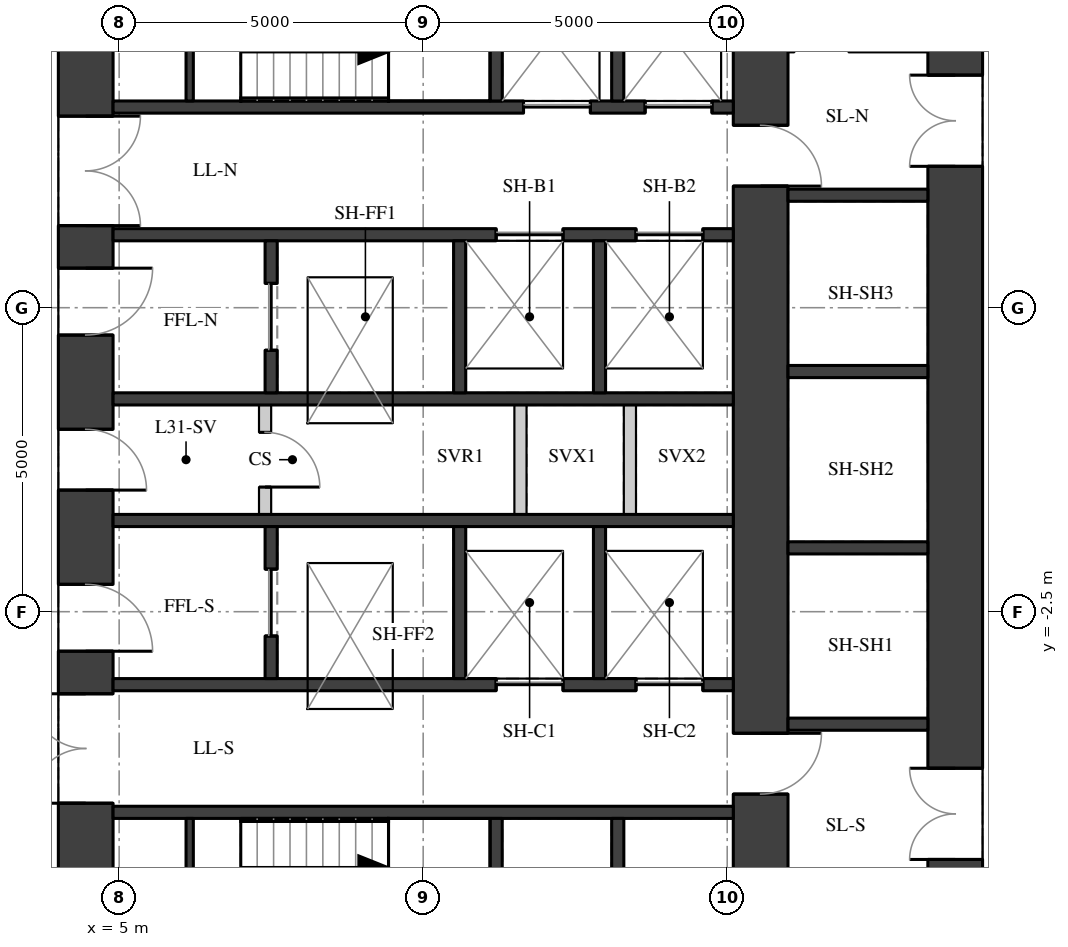
"""IFC4 building model, lengths in metres.
Left out: names, types, materials, properties, quantities, classifications, styles, units other than length and angle.
Written with IfcOpenShell. Run it as: python <this file> out.ifc"""

import sys

from ifc_helpers import new_model, si_unit, direction, frame, frame_2d, origin, place, context, subcontext, project, spatial, rectangle, extrude, element, fill, save


model = new_model("IFC4")
c1 = context("Model", 3, precision=1e-05, world=origin(), true_north=direction((0.0, 1.0)))
c2 = subcontext(c1, "Body", "Model", "MODEL_VIEW")
j1 = project(units=[si_unit("LENGTHUNIT", "METRE"), si_unit("PLANEANGLEUNIT", "RADIAN")], contexts=[c1])
p1 = place(None, origin())
s1 = spatial("IfcSite", under=j1, at=p1, CompositionType="ELEMENT")
p2 = place(p1, origin())
s2 = spatial("IfcBuilding", under=s1, at=p2, CompositionType="ELEMENT")
p3 = place(p2, frame((0.0, 0.0, 112.0)))
s3 = spatial("IfcBuildingStorey", under=s2, at=p3, CompositionType="ELEMENT", Elevation=112.0)
p4 = place(p3, frame((4.45, -11.1, 0.0), z_axis=(0.0, 0.0, 1.0), x_axis=(0.0, 1.0, 0.0)))
e1 = element("IfcWall", 1, at=p4, inside=s3, PredefinedType="SHEAR", context=c2, shape_type="SweptSolid", body=[
    extrude(rectangle(XDim=22.2, YDim=0.9, at=frame_2d((11.1, 0.0))), origin(), (0.0, 0.0, 1.0), 3.02),
])
p5 = place(p4, frame((2.35, 0.0, 0.0)))
e2 = element("IfcOpeningElement", 2, at=p5, cuts=e1, PredefinedType="OPENING", context=c2, shape_type="SweptSolid", body=[
    extrude(rectangle(XDim=1.5, YDim=2.1, at=frame_2d((0.75, 1.05))), frame((0.0, 0.46, 0.0), z_axis=(0.0, -1.0, 0.0), x_axis=(1.0, 0.0, 0.0)), (0.0, 0.0, 1.0), 0.92),
])
p6 = place(p4, frame((5.45, 0.0, 0.0)))
e3 = element("IfcOpeningElement", 3, at=p6, cuts=e1, PredefinedType="OPENING", context=c2, shape_type="SweptSolid", body=[
    extrude(rectangle(XDim=1.8, YDim=2.1, at=frame_2d((0.9, 1.05))), frame((0.0, 0.46, 0.0), z_axis=(0.0, -1.0, 0.0), x_axis=(1.0, 0.0, 0.0)), (0.0, 0.0, 1.0), 0.92),
])
p7 = place(p4, frame((7.95, 0.0, 0.0)))
e4 = element("IfcOpeningElement", 4, at=p7, cuts=e1, PredefinedType="OPENING", context=c2, shape_type="SweptSolid", body=[
    extrude(rectangle(XDim=1.1, YDim=2.1, at=frame_2d((0.55, 1.05))), frame((0.0, 0.46, 0.0), z_axis=(0.0, -1.0, 0.0), x_axis=(1.0, 0.0, 0.0)), (0.0, 0.0, 1.0), 0.92),
])
p8 = place(p4, frame((10.6, 0.0, 0.0)))
e5 = element("IfcOpeningElement", 5, at=p8, cuts=e1, PredefinedType="OPENING", context=c2, shape_type="SweptSolid", body=[
    extrude(rectangle(XDim=1.0, YDim=2.1, at=frame_2d((0.5, 1.05))), frame((0.0, 0.46, 0.0), z_axis=(0.0, -1.0, 0.0), x_axis=(1.0, 0.0, 0.0)), (0.0, 0.0, 1.0), 0.92),
])
p9 = place(p4, frame((13.15, 0.0, 0.0)))
e6 = element("IfcOpeningElement", 6, at=p9, cuts=e1, PredefinedType="OPENING", context=c2, shape_type="SweptSolid", body=[
    extrude(rectangle(XDim=1.1, YDim=2.1, at=frame_2d((0.55, 1.05))), frame((0.0, 0.46, 0.0), z_axis=(0.0, -1.0, 0.0), x_axis=(1.0, 0.0, 0.0)), (0.0, 0.0, 1.0), 0.92),
])
p10 = place(p4, frame((14.95, 0.0, 0.0)))
e7 = element("IfcOpeningElement", 7, at=p10, cuts=e1, PredefinedType="OPENING", context=c2, shape_type="SweptSolid", body=[
    extrude(rectangle(XDim=1.8, YDim=2.1, at=frame_2d((0.9, 1.05))), frame((0.0, 0.46, 0.0), z_axis=(0.0, -1.0, 0.0), x_axis=(1.0, 0.0, 0.0)), (0.0, 0.0, 1.0), 0.92),
])
p11 = place(p4, frame((18.35, 0.0, 0.0)))
e8 = element("IfcOpeningElement", 8, at=p11, cuts=e1, PredefinedType="OPENING", context=c2, shape_type="SweptSolid", body=[
    extrude(rectangle(XDim=1.5, YDim=2.1, at=frame_2d((0.75, 1.05))), frame((0.0, 0.46, 0.0), z_axis=(0.0, -1.0, 0.0), x_axis=(1.0, 0.0, 0.0)), (0.0, 0.0, 1.0), 0.92),
])
p12 = place(p3, frame((18.75, -11.1, 0.0), z_axis=(0.0, 0.0, 1.0), x_axis=(0.0, 1.0, 0.0)))
e9 = element("IfcWall", 9, at=p12, inside=s3, PredefinedType="SHEAR", context=c2, shape_type="SweptSolid", body=[
    extrude(rectangle(XDim=22.2, YDim=0.9, at=frame_2d((11.1, 0.0))), origin(), (0.0, 0.0, 1.0), 3.02),
])
p13 = place(p12, frame((15.925, 0.0, 0.0)))
e10 = element("IfcOpeningElement", 10, at=p13, cuts=e9, PredefinedType="OPENING", context=c2, shape_type="SweptSolid", body=[
    extrude(rectangle(XDim=1.5, YDim=2.1, at=frame_2d((0.75, 1.05))), frame((0.0, 0.46, 0.0), z_axis=(0.0, -1.0, 0.0), x_axis=(1.0, 0.0, 0.0)), (0.0, 0.0, 1.0), 0.92),
])
p14 = place(p12, frame((4.525, 0.0, 0.0)))
e11 = element("IfcOpeningElement", 11, at=p14, cuts=e9, PredefinedType="OPENING", context=c2, shape_type="SweptSolid", body=[
    extrude(rectangle(XDim=1.5, YDim=2.1, at=frame_2d((0.75, 1.05))), frame((0.0, 0.46, 0.0), z_axis=(0.0, -1.0, 0.0), x_axis=(1.0, 0.0, 0.0)), (0.0, 0.0, 1.0), 0.92),
])
p15 = place(p3, frame((15.55, -11.1, 0.0), z_axis=(0.0, 0.0, 1.0), x_axis=(0.0, 1.0, 0.0)))
e12 = element("IfcWall", 12, at=p15, inside=s3, PredefinedType="SHEAR", context=c2, shape_type="SweptSolid", body=[
    extrude(rectangle(XDim=22.2, YDim=0.9, at=frame_2d((11.1, 0.0))), origin(), (0.0, 0.0, 1.0), 3.02),
])
p16 = place(p15, frame((15.6, 0.0, 0.0)))
e13 = element("IfcOpeningElement", 13, at=p16, cuts=e12, PredefinedType="OPENING", context=c2, shape_type="SweptSolid", body=[
    extrude(rectangle(XDim=1.0, YDim=2.1, at=frame_2d((0.5, 1.05))), frame((0.0, 0.46, 0.0), z_axis=(0.0, -1.0, 0.0), x_axis=(1.0, 0.0, 0.0)), (0.0, 0.0, 1.0), 0.92),
])
p17 = place(p15, frame((5.6, 0.0, 0.0)))
e14 = element("IfcOpeningElement", 14, at=p17, cuts=e12, PredefinedType="OPENING", context=c2, shape_type="SweptSolid", body=[
    extrude(rectangle(XDim=1.0, YDim=2.1, at=frame_2d((0.5, 1.05))), frame((0.0, 0.46, 0.0), z_axis=(0.0, -1.0, 0.0), x_axis=(1.0, 0.0, 0.0)), (0.0, 0.0, 1.0), 0.92),
])
p18 = place(p3, frame((4.9, 5.8, 0.0), z_axis=(0.0, 0.0, 1.0), x_axis=(1.0, 0.0, 0.0)))
e15 = element("IfcWall", 15, at=p18, inside=s3, PredefinedType="SHEAR", context=c2, shape_type="SweptSolid", body=[
    extrude(rectangle(XDim=10.2, YDim=0.2, at=frame_2d((5.1, 0.0))), origin(), (0.0, 0.0, 1.0), 3.02),
])
p19 = place(p18, frame((6.75, 0.0, 0.0)))
e16 = element("IfcOpeningElement", 16, at=p19, cuts=e15, PredefinedType="OPENING", context=c2, shape_type="SweptSolid", body=[
    extrude(rectangle(XDim=1.1, YDim=2.1, at=frame_2d((0.55, 1.05))), frame((0.0, 0.11, 0.0), z_axis=(0.0, -1.0, 0.0), x_axis=(1.0, 0.0, 0.0)), (0.0, 0.0, 1.0), 0.22),
])
p20 = place(p18, frame((8.75, 0.0, 0.0)))
e17 = element("IfcOpeningElement", 17, at=p20, cuts=e15, PredefinedType="OPENING", context=c2, shape_type="SweptSolid", body=[
    extrude(rectangle(XDim=1.1, YDim=2.1, at=frame_2d((0.55, 1.05))), frame((0.0, 0.11, 0.0), z_axis=(0.0, -1.0, 0.0), x_axis=(1.0, 0.0, 0.0)), (0.0, 0.0, 1.0), 0.22),
])
p21 = place(p3, frame((4.9, 3.7, 0.0), z_axis=(0.0, 0.0, 1.0), x_axis=(1.0, 0.0, 0.0)))
e18 = element("IfcWall", 18, at=p21, inside=s3, PredefinedType="SHEAR", context=c2, shape_type="SweptSolid", body=[
    extrude(rectangle(XDim=10.2, YDim=0.2, at=frame_2d((5.1, 0.0))), origin(), (0.0, 0.0, 1.0), 3.02),
])
p22 = place(p21, frame((6.3, 0.0, 0.0)))
e19 = element("IfcOpeningElement", 19, at=p22, cuts=e18, PredefinedType="OPENING", context=c2, shape_type="SweptSolid", body=[
    extrude(rectangle(XDim=1.1, YDim=2.1, at=frame_2d((0.55, 1.05))), frame((0.0, 0.11, 0.0), z_axis=(0.0, -1.0, 0.0), x_axis=(1.0, 0.0, 0.0)), (0.0, 0.0, 1.0), 0.22),
])
p23 = place(p21, frame((8.6, 0.0, 0.0)))
e20 = element("IfcOpeningElement", 20, at=p23, cuts=e18, PredefinedType="OPENING", context=c2, shape_type="SweptSolid", body=[
    extrude(rectangle(XDim=1.1, YDim=2.1, at=frame_2d((0.55, 1.05))), frame((0.0, 0.11, 0.0), z_axis=(0.0, -1.0, 0.0), x_axis=(1.0, 0.0, 0.0)), (0.0, 0.0, 1.0), 0.22),
])
for number, where, z_axis, x_axis in (
    (21, (4.9, 1.0, 0.0), (0.0, 0.0, 1.0), (1.0, 0.0, 0.0)),
    (22, (4.9, -1.0, 0.0), (0.0, 0.0, 1.0), (1.0, 0.0, 0.0)),
):
    element("IfcWall", number, at=place(p3, frame(where, z_axis=z_axis, x_axis=x_axis)), inside=s3, PredefinedType="SHEAR", context=c2, shape_type="SweptSolid", body=[
        extrude(rectangle(XDim=10.2, YDim=0.2, at=frame_2d((5.1, 0.0))), origin(), (0.0, 0.0, 1.0), 3.02),
    ])
p24 = place(p3, frame((4.9, -3.7, 0.0), z_axis=(0.0, 0.0, 1.0), x_axis=(1.0, 0.0, 0.0)))
e23 = element("IfcWall", 23, at=p24, inside=s3, PredefinedType="SHEAR", context=c2, shape_type="SweptSolid", body=[
    extrude(rectangle(XDim=10.2, YDim=0.2, at=frame_2d((5.1, 0.0))), origin(), (0.0, 0.0, 1.0), 3.02),
])
p25 = place(p24, frame((6.3, 0.0, 0.0)))
e24 = element("IfcOpeningElement", 24, at=p25, cuts=e23, PredefinedType="OPENING", context=c2, shape_type="SweptSolid", body=[
    extrude(rectangle(XDim=1.1, YDim=2.1, at=frame_2d((0.55, 1.05))), frame((0.0, 0.11, 0.0), z_axis=(0.0, -1.0, 0.0), x_axis=(1.0, 0.0, 0.0)), (0.0, 0.0, 1.0), 0.22),
])
p26 = place(p24, frame((8.6, 0.0, 0.0)))
e25 = element("IfcOpeningElement", 25, at=p26, cuts=e23, PredefinedType="OPENING", context=c2, shape_type="SweptSolid", body=[
    extrude(rectangle(XDim=1.1, YDim=2.1, at=frame_2d((0.55, 1.05))), frame((0.0, 0.11, 0.0), z_axis=(0.0, -1.0, 0.0), x_axis=(1.0, 0.0, 0.0)), (0.0, 0.0, 1.0), 0.22),
])
p27 = place(p3, frame((4.9, -5.8, 0.0), z_axis=(0.0, 0.0, 1.0), x_axis=(1.0, 0.0, 0.0)))
e26 = element("IfcWall", 26, at=p27, inside=s3, PredefinedType="SHEAR", context=c2, shape_type="SweptSolid", body=[
    extrude(rectangle(XDim=10.2, YDim=0.2, at=frame_2d((5.1, 0.0))), origin(), (0.0, 0.0, 1.0), 3.02),
])
for number, where, z_axis, x_axis in (
    (27, (11.2, 5.9, 0.0), (0.0, 0.0, 1.0), (0.0, 1.0, 0.0)),
    (28, (11.2, -9.1, 0.0), (0.0, 0.0, 1.0), (0.0, 1.0, 0.0)),
    (29, (13.2, 5.9, 0.0), (0.0, 0.0, 1.0), (0.0, 1.0, 0.0)),
    (30, (13.2, -9.1, 0.0), (0.0, 0.0, 1.0), (0.0, 1.0, 0.0)),
):
    element("IfcWall", number, at=place(p3, frame(where, z_axis=z_axis, x_axis=x_axis)), inside=s3, PredefinedType="SHEAR", context=c2, shape_type="SweptSolid", body=[
        extrude(rectangle(XDim=3.2, YDim=0.2, at=frame_2d((1.6, 0.0))), origin(), (0.0, 0.0, 1.0), 3.02),
    ])
p28 = place(p3, frame((7.5, 1.1, 0.0), z_axis=(0.0, 0.0, 1.0), x_axis=(0.0, 1.0, 0.0)))
e31 = element("IfcWall", 31, at=p28, inside=s3, PredefinedType="SHEAR", context=c2, shape_type="SweptSolid", body=[
    extrude(rectangle(XDim=2.5, YDim=0.2, at=frame_2d((1.25, 0.0))), origin(), (0.0, 0.0, 1.0), 3.02),
])
p29 = place(p28, frame((0.7, 0.0, 0.0)))
e32 = element("IfcOpeningElement", 32, at=p29, cuts=e31, PredefinedType="OPENING", context=c2, shape_type="SweptSolid", body=[
    extrude(rectangle(XDim=1.1, YDim=2.1, at=frame_2d((0.55, 1.05))), frame((0.0, 0.11, 0.0), z_axis=(0.0, -1.0, 0.0), x_axis=(1.0, 0.0, 0.0)), (0.0, 0.0, 1.0), 0.22),
])
p30 = place(p3, frame((7.5, -3.6, 0.0), z_axis=(0.0, 0.0, 1.0), x_axis=(0.0, 1.0, 0.0)))
e33 = element("IfcWall", 33, at=p30, inside=s3, PredefinedType="SHEAR", context=c2, shape_type="SweptSolid", body=[
    extrude(rectangle(XDim=2.5, YDim=0.2, at=frame_2d((1.25, 0.0))), origin(), (0.0, 0.0, 1.0), 3.02),
])
p31 = place(p30, frame((0.7, 0.0, 0.0)))
e34 = element("IfcOpeningElement", 34, at=p31, cuts=e33, PredefinedType="OPENING", context=c2, shape_type="SweptSolid", body=[
    extrude(rectangle(XDim=1.1, YDim=2.1, at=frame_2d((0.55, 1.05))), frame((0.0, 0.11, 0.0), z_axis=(0.0, -1.0, 0.0), x_axis=(1.0, 0.0, 0.0)), (0.0, 0.0, 1.0), 0.22),
])
for number, where, z_axis, x_axis in (
    (35, (10.6, 1.1, 0.0), (0.0, 0.0, 1.0), (0.0, 1.0, 0.0)),
    (36, (10.6, -3.6, 0.0), (0.0, 0.0, 1.0), (0.0, 1.0, 0.0)),
    (37, (12.9, 1.1, 0.0), (0.0, 0.0, 1.0), (0.0, 1.0, 0.0)),
    (38, (12.9, -3.6, 0.0), (0.0, 0.0, 1.0), (0.0, 1.0, 0.0)),
):
    element("IfcWall", number, at=place(p3, frame(where, z_axis=z_axis, x_axis=x_axis)), inside=s3, PredefinedType="SHEAR", context=c2, shape_type="SweptSolid", body=[
        extrude(rectangle(XDim=2.5, YDim=0.2, at=frame_2d((1.25, 0.0))), origin(), (0.0, 0.0, 1.0), 3.02),
    ])
p32 = place(p3, frame((6.16, 5.9, 0.0), z_axis=(0.0, 0.0, 1.0), x_axis=(0.0, 1.0, 0.0)))
e39 = element("IfcWall", 39, at=p32, inside=s3, PredefinedType="SHEAR", context=c2, shape_type="SweptSolid", body=[
    extrude(rectangle(XDim=3.2, YDim=0.12, at=frame_2d((1.6, 0.0))), origin(), (0.0, 0.0, 1.0), 3.02),
])
p33 = place(p32, frame((0.85, 0.0, 0.0)))
e40 = element("IfcOpeningElement", 40, at=p33, cuts=e39, PredefinedType="OPENING", context=c2, shape_type="SweptSolid", body=[
    extrude(rectangle(XDim=1.5, YDim=2.1, at=frame_2d((0.75, 1.05))), frame((0.0, 0.07, 0.0), z_axis=(0.0, -1.0, 0.0), x_axis=(1.0, 0.0, 0.0)), (0.0, 0.0, 1.0), 0.14),
])
p34 = place(p3, frame((6.16, -9.1, 0.0), z_axis=(0.0, 0.0, 1.0), x_axis=(0.0, 1.0, 0.0)))
e41 = element("IfcWall", 41, at=p34, inside=s3, PredefinedType="SHEAR", context=c2, shape_type="SweptSolid", body=[
    extrude(rectangle(XDim=3.2, YDim=0.12, at=frame_2d((1.6, 0.0))), origin(), (0.0, 0.0, 1.0), 3.02),
])
p35 = place(p34, frame((0.85, 0.0, 0.0)))
e42 = element("IfcOpeningElement", 42, at=p35, cuts=e41, PredefinedType="OPENING", context=c2, shape_type="SweptSolid", body=[
    extrude(rectangle(XDim=1.5, YDim=2.1, at=frame_2d((0.75, 1.05))), frame((0.0, 0.07, 0.0), z_axis=(0.0, -1.0, 0.0), x_axis=(1.0, 0.0, 0.0)), (0.0, 0.0, 1.0), 0.14),
])
p36 = place(p3, frame((7.4, -0.9, 0.0), z_axis=(0.0, 0.0, 1.0), x_axis=(0.0, 1.0, 0.0)))
e43 = element("IfcWall", 43, at=p36, inside=s3, PredefinedType="PARTITIONING", context=c2, shape_type="SweptSolid", body=[
    extrude(rectangle(XDim=1.8, YDim=0.2, at=frame_2d((0.9, 0.0))), origin(), (0.0, 0.0, 1.0), 3.02),
])
p37 = place(p36, frame((0.45, 0.0, 0.0)))
e44 = element("IfcOpeningElement", 44, at=p37, cuts=e43, PredefinedType="OPENING", context=c2, shape_type="SweptSolid", body=[
    extrude(rectangle(XDim=0.9, YDim=2.1, at=frame_2d((0.45, 1.05))), frame((0.0, 0.11, 0.0), z_axis=(0.0, -1.0, 0.0), x_axis=(1.0, 0.0, 0.0)), (0.0, 0.0, 1.0), 0.22),
])
for number, where, z_axis, x_axis in (
    (45, (11.6, -0.9, 0.0), (0.0, 0.0, 1.0), (0.0, 1.0, 0.0)),
    (46, (13.4, -0.9, 0.0), (0.0, 0.0, 1.0), (0.0, 1.0, 0.0)),
):
    element("IfcWall", number, at=place(p3, frame(where, z_axis=z_axis, x_axis=x_axis)), inside=s3, PredefinedType="PARTITIONING", context=c2, shape_type="SweptSolid", body=[
        extrude(rectangle(XDim=1.8, YDim=0.2, at=frame_2d((0.9, 0.0))), origin(), (0.0, 0.0, 1.0), 3.02),
    ])
for number, where, z_axis, x_axis in (
    (47, (16.0, -4.35, 0.0), (0.0, 0.0, 1.0), (1.0, 0.0, 0.0)),
    (48, (16.0, -1.45, 0.0), (0.0, 0.0, 1.0), (1.0, 0.0, 0.0)),
    (49, (16.0, 1.45, 0.0), (0.0, 0.0, 1.0), (1.0, 0.0, 0.0)),
    (50, (16.0, 4.35, 0.0), (0.0, 0.0, 1.0), (1.0, 0.0, 0.0)),
):
    element("IfcWall", number, at=place(p3, frame(where, z_axis=z_axis, x_axis=x_axis)), inside=s3, PredefinedType="SHEAR", context=c2, shape_type="SweptSolid", body=[
        extrude(rectangle(XDim=2.3, YDim=0.2, at=frame_2d((1.15, 0.0))), origin(), (0.0, 0.0, 1.0), 3.02),
    ])
p38 = place(p6, origin())
e51 = element("IfcDoor", 51, at=p38, inside=s3, OperationType="DOUBLE_DOOR_SINGLE_SWING", PredefinedType="DOOR", context=c2, shape_type="SweptSolid", body=[
    extrude(rectangle(XDim=1.8, YDim=2.1, at=frame_2d((0.9, 1.05))), frame((0.0, 0.025, 0.0), z_axis=(0.0, -1.0, 0.0), x_axis=(1.0, 0.0, 0.0)), (0.0, 0.0, 1.0), 0.05),
])
fill(e3, e51)
p39 = place(p7, origin())
e52 = element("IfcDoor", 52, at=p39, inside=s3, OperationType="SINGLE_SWING_RIGHT", PredefinedType="DOOR", context=c2, shape_type="SweptSolid", body=[
    extrude(rectangle(XDim=1.1, YDim=2.1, at=frame_2d((0.55, 1.05))), frame((0.0, 0.025, 0.0), z_axis=(0.0, -1.0, 0.0), x_axis=(1.0, 0.0, 0.0)), (0.0, 0.0, 1.0), 0.05),
])
fill(e4, e52)
p40 = place(p8, origin())
e53 = element("IfcDoor", 53, at=p40, inside=s3, OperationType="SINGLE_SWING_RIGHT", PredefinedType="DOOR", context=c2, shape_type="SweptSolid", body=[
    extrude(rectangle(XDim=1.0, YDim=2.1, at=frame_2d((0.5, 1.05))), frame((0.0, 0.025, 0.0), z_axis=(0.0, -1.0, 0.0), x_axis=(1.0, 0.0, 0.0)), (0.0, 0.0, 1.0), 0.05),
])
fill(e5, e53)
p41 = place(p9, origin())
e54 = element("IfcDoor", 54, at=p41, inside=s3, OperationType="SINGLE_SWING_LEFT", PredefinedType="DOOR", context=c2, shape_type="SweptSolid", body=[
    extrude(rectangle(XDim=1.1, YDim=2.1, at=frame_2d((0.55, 1.05))), frame((0.0, 0.025, 0.0), z_axis=(0.0, -1.0, 0.0), x_axis=(1.0, 0.0, 0.0)), (0.0, 0.0, 1.0), 0.05),
])
fill(e6, e54)
p42 = place(p10, origin())
e55 = element("IfcDoor", 55, at=p42, inside=s3, OperationType="DOUBLE_DOOR_SINGLE_SWING", PredefinedType="DOOR", context=c2, shape_type="SweptSolid", body=[
    extrude(rectangle(XDim=1.8, YDim=2.1, at=frame_2d((0.9, 1.05))), frame((0.0, 0.025, 0.0), z_axis=(0.0, -1.0, 0.0), x_axis=(1.0, 0.0, 0.0)), (0.0, 0.0, 1.0), 0.05),
])
fill(e7, e55)
p43 = place(p13, origin())
e56 = element("IfcDoor", 56, at=p43, inside=s3, OperationType="DOUBLE_DOOR_SINGLE_SWING", PredefinedType="DOOR", context=c2, shape_type="SweptSolid", body=[
    extrude(rectangle(XDim=1.5, YDim=2.1, at=frame_2d((0.75, 1.05))), frame((0.0, 0.025, 0.0), z_axis=(0.0, -1.0, 0.0), x_axis=(1.0, 0.0, 0.0)), (0.0, 0.0, 1.0), 0.05),
])
fill(e10, e56)
p44 = place(p14, origin())
e57 = element("IfcDoor", 57, at=p44, inside=s3, OperationType="DOUBLE_DOOR_SINGLE_SWING", PredefinedType="DOOR", context=c2, shape_type="SweptSolid", body=[
    extrude(rectangle(XDim=1.5, YDim=2.1, at=frame_2d((0.75, 1.05))), frame((0.0, 0.025, 0.0), z_axis=(0.0, -1.0, 0.0), x_axis=(1.0, 0.0, 0.0)), (0.0, 0.0, 1.0), 0.05),
])
fill(e11, e57)
p45 = place(p19, origin())
e58 = element("IfcDoor", 58, at=p45, inside=s3, OperationType="DOUBLE_DOOR_SLIDING", PredefinedType="DOOR", context=c2, shape_type="SweptSolid", body=[
    extrude(rectangle(XDim=1.1, YDim=2.1, at=frame_2d((0.55, 1.05))), frame((0.0, 0.025, 0.0), z_axis=(0.0, -1.0, 0.0), x_axis=(1.0, 0.0, 0.0)), (0.0, 0.0, 1.0), 0.05),
])
fill(e16, e58)
p46 = place(p20, origin())
e59 = element("IfcDoor", 59, at=p46, inside=s3, OperationType="DOUBLE_DOOR_SLIDING", PredefinedType="DOOR", context=c2, shape_type="SweptSolid", body=[
    extrude(rectangle(XDim=1.1, YDim=2.1, at=frame_2d((0.55, 1.05))), frame((0.0, 0.025, 0.0), z_axis=(0.0, -1.0, 0.0), x_axis=(1.0, 0.0, 0.0)), (0.0, 0.0, 1.0), 0.05),
])
fill(e17, e59)
p47 = place(p22, origin())
e60 = element("IfcDoor", 60, at=p47, inside=s3, OperationType="DOUBLE_DOOR_SLIDING", PredefinedType="DOOR", context=c2, shape_type="SweptSolid", body=[
    extrude(rectangle(XDim=1.1, YDim=2.1, at=frame_2d((0.55, 1.05))), frame((0.0, 0.025, 0.0), z_axis=(0.0, -1.0, 0.0), x_axis=(1.0, 0.0, 0.0)), (0.0, 0.0, 1.0), 0.05),
])
fill(e19, e60)
p48 = place(p23, origin())
e61 = element("IfcDoor", 61, at=p48, inside=s3, OperationType="DOUBLE_DOOR_SLIDING", PredefinedType="DOOR", context=c2, shape_type="SweptSolid", body=[
    extrude(rectangle(XDim=1.1, YDim=2.1, at=frame_2d((0.55, 1.05))), frame((0.0, 0.025, 0.0), z_axis=(0.0, -1.0, 0.0), x_axis=(1.0, 0.0, 0.0)), (0.0, 0.0, 1.0), 0.05),
])
fill(e20, e61)
p49 = place(p25, origin())
e62 = element("IfcDoor", 62, at=p49, inside=s3, OperationType="DOUBLE_DOOR_SLIDING", PredefinedType="DOOR", context=c2, shape_type="SweptSolid", body=[
    extrude(rectangle(XDim=1.1, YDim=2.1, at=frame_2d((0.55, 1.05))), frame((0.0, 0.025, 0.0), z_axis=(0.0, -1.0, 0.0), x_axis=(1.0, 0.0, 0.0)), (0.0, 0.0, 1.0), 0.05),
])
fill(e24, e62)
p50 = place(p26, origin())
e63 = element("IfcDoor", 63, at=p50, inside=s3, OperationType="DOUBLE_DOOR_SLIDING", PredefinedType="DOOR", context=c2, shape_type="SweptSolid", body=[
    extrude(rectangle(XDim=1.1, YDim=2.1, at=frame_2d((0.55, 1.05))), frame((0.0, 0.025, 0.0), z_axis=(0.0, -1.0, 0.0), x_axis=(1.0, 0.0, 0.0)), (0.0, 0.0, 1.0), 0.05),
])
fill(e25, e63)
p51 = place(p29, origin())
e64 = element("IfcDoor", 64, at=p51, inside=s3, OperationType="DOUBLE_DOOR_SLIDING", PredefinedType="DOOR", context=c2, shape_type="SweptSolid", body=[
    extrude(rectangle(XDim=1.1, YDim=2.1, at=frame_2d((0.55, 1.05))), frame((0.0, 0.025, 0.0), z_axis=(0.0, -1.0, 0.0), x_axis=(1.0, 0.0, 0.0)), (0.0, 0.0, 1.0), 0.05),
])
fill(e32, e64)
p52 = place(p31, origin())
e65 = element("IfcDoor", 65, at=p52, inside=s3, OperationType="DOUBLE_DOOR_SLIDING", PredefinedType="DOOR", context=c2, shape_type="SweptSolid", body=[
    extrude(rectangle(XDim=1.1, YDim=2.1, at=frame_2d((0.55, 1.05))), frame((0.0, 0.025, 0.0), z_axis=(0.0, -1.0, 0.0), x_axis=(1.0, 0.0, 0.0)), (0.0, 0.0, 1.0), 0.05),
])
fill(e34, e65)
p53 = place(p37, origin())
e66 = element("IfcDoor", 66, at=p53, inside=s3, OperationType="SINGLE_SWING_RIGHT", PredefinedType="DOOR", context=c2, shape_type="SweptSolid", body=[
    extrude(rectangle(XDim=0.9, YDim=2.1, at=frame_2d((0.45, 1.05))), frame((0.0, 0.025, 0.0), z_axis=(0.0, -1.0, 0.0), x_axis=(1.0, 0.0, 0.0)), (0.0, 0.0, 1.0), 0.05),
])
fill(e44, e66)
p54 = place(p16, origin())
e67 = element("IfcDoor", 67, at=p54, inside=s3, OperationType="SINGLE_SWING_RIGHT", PredefinedType="DOOR", context=c2, shape_type="SweptSolid", body=[
    extrude(rectangle(XDim=1.0, YDim=2.1, at=frame_2d((0.5, 1.05))), frame((0.0, 0.025, 0.0), z_axis=(0.0, -1.0, 0.0), x_axis=(1.0, 0.0, 0.0)), (0.0, 0.0, 1.0), 0.05),
])
fill(e13, e67)
p55 = place(p17, origin())
e68 = element("IfcDoor", 68, at=p55, inside=s3, OperationType="SINGLE_SWING_LEFT", PredefinedType="DOOR", context=c2, shape_type="SweptSolid", body=[
    extrude(rectangle(XDim=1.0, YDim=2.1, at=frame_2d((0.5, 1.05))), frame((0.0, 0.025, 0.0), z_axis=(0.0, -1.0, 0.0), x_axis=(1.0, 0.0, 0.0)), (0.0, 0.0, 1.0), 0.05),
])
fill(e14, e68)
save(model, sys.argv[1])
